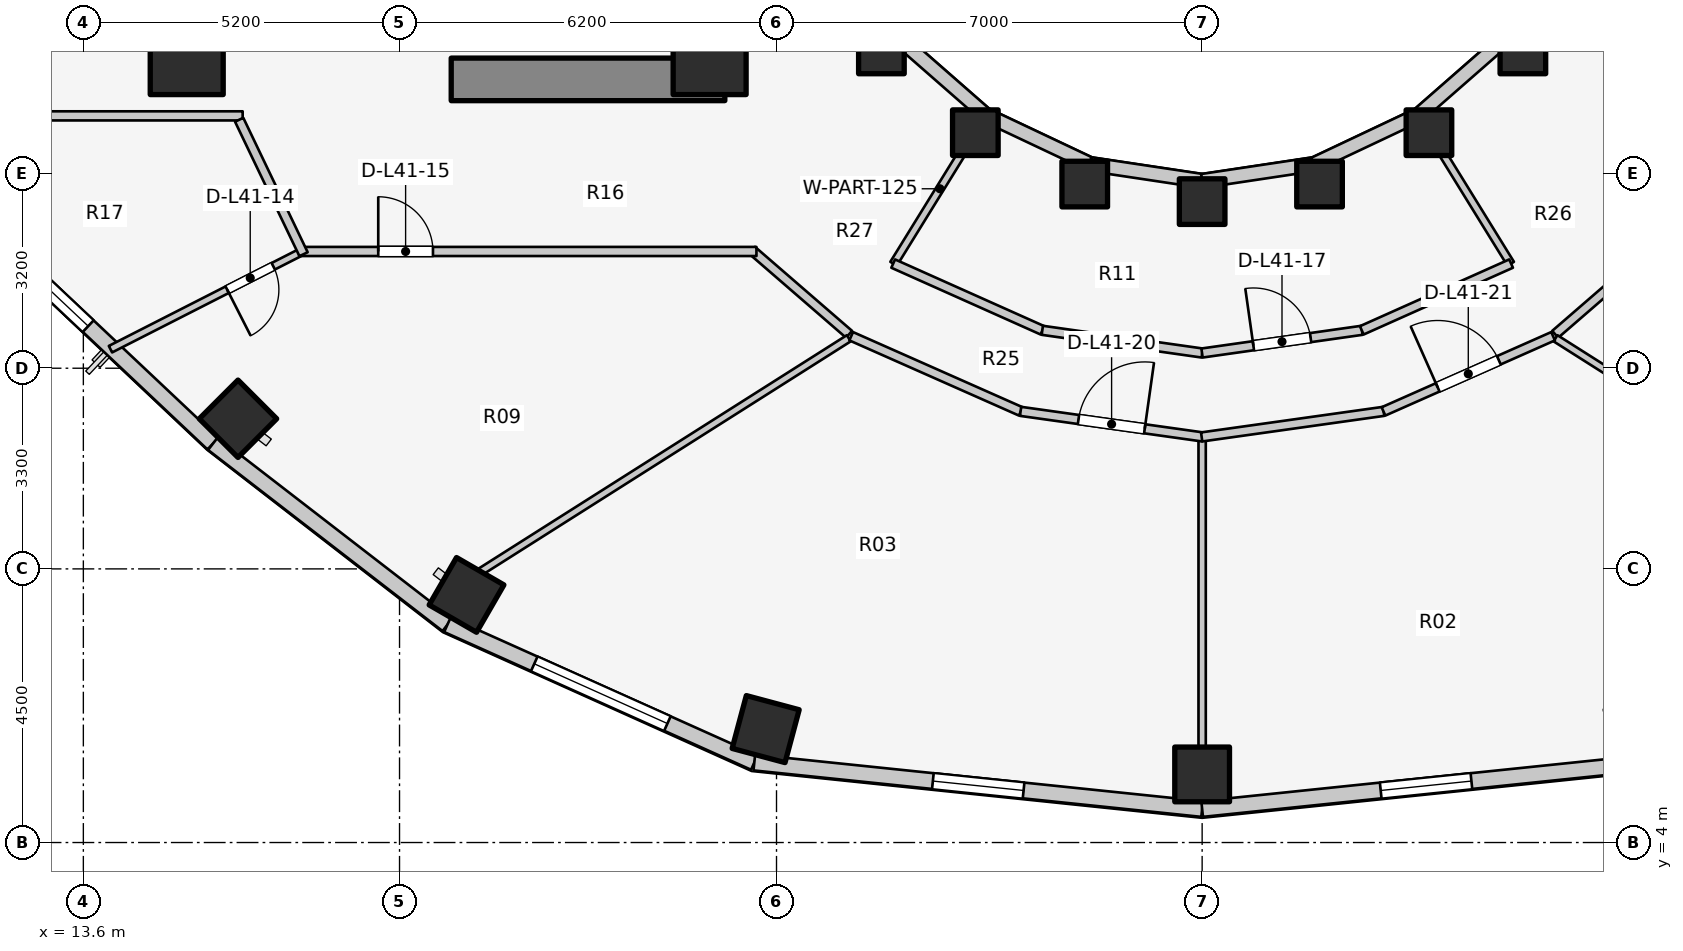
"""IFC4 building model, lengths in metres.
Left out: names, types, materials, properties, quantities, classifications, styles, units other than length and angle.
Written with IfcOpenShell. Run it as: python <this file> out.ifc"""

import sys

from ifc_helpers import new_model, si_unit, direction, frame, frame_2d, origin, origin_2d, place, context, subcontext, project, spatial, rectangle, extrude, element, fill, save


model = new_model("IFC4")
c1 = context("Model", 3, precision=1e-05, world=origin(), true_north=direction((0.0, 1.0)))
c2 = subcontext(c1, "Body", "Model", "MODEL_VIEW")
j1 = project(units=[si_unit("LENGTHUNIT", "METRE"), si_unit("PLANEANGLEUNIT", "RADIAN")], contexts=[c1])
p1 = place(None, origin())
s1 = spatial("IfcSite", under=j1, at=p1, CompositionType="ELEMENT")
p2 = place(p1, origin())
s2 = spatial("IfcBuilding", under=s1, at=p2, CompositionType="ELEMENT")
p3 = place(p2, frame((0.0, 0.0, 137.4)))
s3 = spatial("IfcBuildingStorey", under=s2, at=p3, CompositionType="ELEMENT", Elevation=137.4)
p4 = place(p3, frame((19.65, 16.55, 0.0), z_axis=(0.0, 0.0, 1.0), x_axis=(1.0, 0.0, 0.0)))
e1 = element("IfcWall", 1, at=p4, inside=s3, PredefinedType="SHEAR", context=c2, shape_type="SweptSolid", body=[
    extrude(rectangle(XDim=4.5, YDim=0.7, at=frame_2d((2.25, 0.0))), origin(), (0.0, 0.0, 1.0), 3.1),
])
for number, where, z_axis, x_axis in (
    (2, (15.3, 16.9, 0.0), (0.0, 0.0, 1.0), (1.0, 0.0, 0.0)),
    (3, (23.9, 16.9, 0.0), (0.0, 0.0, 1.0), (1.0, 0.0, 0.0)),
):
    element("IfcColumn", number, at=place(p3, frame(where, z_axis=z_axis, x_axis=x_axis)), inside=s3, PredefinedType="COLUMN", context=c2, shape_type="SweptSolid", body=[
        extrude(rectangle(XDim=1.2, YDim=1.2, at=origin_2d()), origin(), (0.0, 0.0, 1.0), 3.1),
    ])
p5 = place(p3, frame((26.725, 17.018, 0.0), z_axis=(0.0, 0.0, 1.0), x_axis=(1.0, 0.0, 0.0)))
e4 = element("IfcColumn", 4, at=p5, inside=s3, PredefinedType="COLUMN", context=c2, shape_type="SweptSolid", body=[
    extrude(rectangle(XDim=0.75, YDim=0.75, at=origin_2d()), origin(), (0.0, 0.0, 1.0), 3.1),
])
p6 = place(p3, frame((16.143, 10.969, 0.0), z_axis=(0.0, 0.0, 1.0), x_axis=(-0.707106781187, -0.707106781187, 0.0)))
e5 = element("IfcColumn", 5, at=p6, inside=s3, PredefinedType="COLUMN", context=c2, shape_type="SweptSolid", body=[
    extrude(rectangle(XDim=0.9, YDim=0.9, at=origin_2d()), origin(), (0.0, 0.0, 1.0), 3.1),
])
p7 = place(p3, frame((28.27, 15.673, 0.0), z_axis=(0.0, 0.0, 1.0), x_axis=(1.0, 0.0, 0.0)))
e6 = element("IfcColumn", 6, at=p7, inside=s3, PredefinedType="COLUMN", context=c2, shape_type="SweptSolid", body=[
    extrude(rectangle(XDim=0.75, YDim=0.75, at=origin_2d()), origin(), (0.0, 0.0, 1.0), 3.1),
])
p8 = place(p3, frame((19.902, 8.072, 0.0), z_axis=(0.0, 0.0, 1.0), x_axis=(-0.5, -0.866025403784, 0.0)))
e7 = element("IfcColumn", 7, at=p8, inside=s3, PredefinedType="COLUMN", context=c2, shape_type="SweptSolid", body=[
    extrude(rectangle(XDim=0.9, YDim=0.9, at=origin_2d()), origin(), (0.0, 0.0, 1.0), 3.1),
])
p9 = place(p3, frame((30.069, 14.828, 0.0), z_axis=(0.0, 0.0, 1.0), x_axis=(1.0, 0.0, 0.0)))
e8 = element("IfcColumn", 8, at=p9, inside=s3, PredefinedType="COLUMN", context=c2, shape_type="SweptSolid", body=[
    extrude(rectangle(XDim=0.75, YDim=0.75, at=origin_2d()), origin(), (0.0, 0.0, 1.0), 3.1),
])
p10 = place(p3, frame((24.822, 5.865, 0.0), z_axis=(0.0, 0.0, 1.0), x_axis=(-0.258819045103, -0.965925826289, 0.0)))
e9 = element("IfcColumn", 9, at=p10, inside=s3, PredefinedType="COLUMN", context=c2, shape_type="SweptSolid", body=[
    extrude(rectangle(XDim=0.9, YDim=0.9, at=origin_2d()), origin(), (0.0, 0.0, 1.0), 3.1),
])
p11 = place(p3, frame((32.0, 14.54, 0.0), z_axis=(0.0, 0.0, 1.0), x_axis=(1.0, 0.0, 0.0)))
e10 = element("IfcColumn", 10, at=p11, inside=s3, PredefinedType="COLUMN", context=c2, shape_type="SweptSolid", body=[
    extrude(rectangle(XDim=0.75, YDim=0.75, at=origin_2d()), origin(), (0.0, 0.0, 1.0), 3.1),
])
p12 = place(p3, frame((32.0, 5.12, 0.0), z_axis=(0.0, 0.0, 1.0), x_axis=(0.0, -1.0, 0.0)))
e11 = element("IfcColumn", 11, at=p12, inside=s3, PredefinedType="COLUMN", context=c2, shape_type="SweptSolid", body=[
    extrude(rectangle(XDim=0.9, YDim=0.9, at=origin_2d()), origin(), (0.0, 0.0, 1.0), 3.1),
])
for number, where, z_axis, x_axis in (
    (12, (33.931, 14.828, 0.0), (0.0, 0.0, 1.0), (1.0, 0.0, 0.0)),
    (13, (35.73, 15.673, 0.0), (0.0, 0.0, 1.0), (1.0, 0.0, 0.0)),
    (14, (37.275, 17.018, 0.0), (0.0, 0.0, 1.0), (1.0, 0.0, 0.0)),
):
    element("IfcColumn", number, at=place(p3, frame(where, z_axis=z_axis, x_axis=x_axis)), inside=s3, PredefinedType="COLUMN", context=c2, shape_type="SweptSolid", body=[
        extrude(rectangle(XDim=0.75, YDim=0.75, at=origin_2d()), origin(), (0.0, 0.0, 1.0), 3.1),
    ])
p13 = place(p3, frame((26.965, 17.258, 0.0), z_axis=(0.0, 0.0, 1.0), x_axis=(0.752576694707, -0.658504607869, 0.0)))
e15 = element("IfcWall", 15, at=p13, inside=s3, PredefinedType="STANDARD", context=c2, shape_type="SweptSolid", body=[
    extrude(rectangle(XDim=1.959, YDim=0.23, at=frame_2d((0.98, 0.0))), origin(), (0.0, 0.0, 1.0), 2.16),
])
p14 = place(p3, frame((28.44, 15.968, 0.0), z_axis=(0.0, 0.0, 1.0), x_axis=(0.904179699603, -0.427152280606, 0.0)))
e16 = element("IfcWall", 16, at=p14, inside=s3, PredefinedType="STANDARD", context=c2, shape_type="SweptSolid", body=[
    extrude(rectangle(XDim=1.899, YDim=0.23, at=frame_2d((0.95, 0.0))), origin(), (0.0, 0.0, 1.0), 2.16),
])
for number, where, z_axis, x_axis in (
    (17, (30.157, 15.157, 0.0), (0.0, 0.0, 1.0), (0.989, -0.149, 0.0)),
    (18, (32.0, 14.88, 0.0), (0.0, 0.0, 1.0), (0.989, 0.149, 0.0)),
):
    element("IfcWall", number, at=place(p3, frame(where, z_axis=z_axis, x_axis=x_axis)), inside=s3, PredefinedType="STANDARD", context=c2, shape_type="SweptSolid", body=[
        extrude(rectangle(XDim=1.864, YDim=0.23, at=frame_2d((0.932, 0.0))), origin(), (0.0, 0.0, 1.0), 2.16),
    ])
p15 = place(p3, frame((33.843, 15.157, 0.0), z_axis=(0.0, 0.0, 1.0), x_axis=(0.904179699603, 0.427152280606, 0.0)))
e19 = element("IfcWall", 19, at=p15, inside=s3, PredefinedType="STANDARD", context=c2, shape_type="SweptSolid", body=[
    extrude(rectangle(XDim=1.899, YDim=0.23, at=frame_2d((0.95, 0.0))), origin(), (0.0, 0.0, 1.0), 2.16),
])
p16 = place(p3, frame((35.56, 15.968, 0.0), z_axis=(0.0, 0.0, 1.0), x_axis=(0.752576694707, 0.658504607869, 0.0)))
e20 = element("IfcWall", 20, at=p16, inside=s3, PredefinedType="STANDARD", context=c2, shape_type="SweptSolid", body=[
    extrude(rectangle(XDim=1.959, YDim=0.23, at=frame_2d((0.98, 0.0))), origin(), (0.0, 0.0, 1.0), 2.16),
])
p17 = place(p3, frame((12.381, 13.716, 0.0), z_axis=(0.0, 0.0, 1.0), x_axis=(0.727667301037, -0.68593024354, 0.0)))
e21 = element("IfcWall", 21, at=p17, inside=s3, PredefinedType="STANDARD", context=c2, shape_type="SweptSolid", body=[
    extrude(rectangle(XDim=4.604, YDim=0.26, at=frame_2d((2.302, 0.0))), origin(), (0.0, 0.0, 1.0), 2.85),
])
p18 = place(p17, frame((0.585, 0.0, 0.75)))
e22 = element("IfcOpeningElement", 22, at=p18, cuts=e21, PredefinedType="OPENING", context=c2, shape_type="SweptSolid", body=[
    extrude(rectangle(XDim=1.2, YDim=1.5, at=frame_2d((0.6, 0.75))), frame((0.0, 0.14, 0.0), z_axis=(0.0, -1.0, 0.0), x_axis=(1.0, 0.0, 0.0)), (0.0, 0.0, 1.0), 0.28),
])
p19 = place(p3, frame((15.731, 10.559, 0.0), z_axis=(0.0, 0.0, 1.0), x_axis=(0.791460185804, -0.611220724687, 0.0)))
e23 = element("IfcWall", 23, at=p19, inside=s3, PredefinedType="STANDARD", context=c2, shape_type="SweptSolid", body=[
    extrude(rectangle(XDim=4.872, YDim=0.26, at=frame_2d((2.436, 0.0))), origin(), (0.0, 0.0, 1.0), 2.85),
])
p20 = place(p3, frame((19.587, 7.581, 0.0), z_axis=(0.0, 0.0, 1.0), x_axis=(0.912353637112, -0.409403029847, 0.0)))
e24 = element("IfcWall", 24, at=p20, inside=s3, PredefinedType="STANDARD", context=c2, shape_type="SweptSolid", body=[
    extrude(rectangle(XDim=5.533, YDim=0.26, at=frame_2d((2.766, 0.0))), origin(), (0.0, 0.0, 1.0), 2.85),
])
p21 = place(p20, frame((1.566, 0.0, 0.75)))
e25 = element("IfcOpeningElement", 25, at=p21, cuts=e24, PredefinedType="OPENING", context=c2, shape_type="SweptSolid", body=[
    extrude(rectangle(XDim=2.4, YDim=1.7, at=frame_2d((1.2, 0.85))), frame((0.0, 0.14, 0.0), z_axis=(0.0, -1.0, 0.0), x_axis=(1.0, 0.0, 0.0)), (0.0, 0.0, 1.0), 0.28),
])
p22 = place(p3, frame((24.635, 5.315, 0.0), z_axis=(0.0, 0.0, 1.0), x_axis=(0.994664178965, -0.10316574569, 0.0)))
e26 = element("IfcWall", 26, at=p22, inside=s3, PredefinedType="STANDARD", context=c2, shape_type="SweptSolid", body=[
    extrude(rectangle(XDim=7.405, YDim=0.26, at=frame_2d((3.702, 0.0))), origin(), (0.0, 0.0, 1.0), 2.85),
])
p23 = place(p22, frame((2.952, 0.0, 0.75)))
e27 = element("IfcOpeningElement", 27, at=p23, cuts=e26, PredefinedType="OPENING", context=c2, shape_type="SweptSolid", body=[
    extrude(rectangle(XDim=1.5, YDim=1.6, at=frame_2d((0.75, 0.8))), frame((0.0, 0.14, 0.0), z_axis=(0.0, -1.0, 0.0), x_axis=(1.0, 0.0, 0.0)), (0.0, 0.0, 1.0), 0.28),
])
p24 = place(p3, frame((32.0, 4.552, 0.0), z_axis=(0.0, 0.0, 1.0), x_axis=(0.994664178965, 0.10316574569, 0.0)))
e28 = element("IfcWall", 28, at=p24, inside=s3, PredefinedType="STANDARD", context=c2, shape_type="SweptSolid", body=[
    extrude(rectangle(XDim=7.405, YDim=0.26, at=frame_2d((3.702, 0.0))), origin(), (0.0, 0.0, 1.0), 2.85),
])
p25 = place(p24, frame((2.952, 0.0, 0.75)))
e29 = element("IfcOpeningElement", 29, at=p25, cuts=e28, PredefinedType="OPENING", context=c2, shape_type="SweptSolid", body=[
    extrude(rectangle(XDim=1.5, YDim=1.6, at=frame_2d((0.75, 0.8))), frame((0.0, 0.14, 0.0), z_axis=(0.0, -1.0, 0.0), x_axis=(1.0, 0.0, 0.0)), (0.0, 0.0, 1.0), 0.28),
])
p26 = place(p3, frame((10.96, 15.95, 0.0), z_axis=(0.0, 0.0, 1.0), x_axis=(1.0, 0.0, 0.0)))
e30 = element("IfcWall", 30, at=p26, inside=s3, PredefinedType="PARTITIONING", context=c2, shape_type="SweptSolid", body=[
    extrude(rectangle(XDim=5.26, YDim=0.15, at=frame_2d((2.63, 0.0))), origin(), (0.0, 0.0, 1.0), 2.22),
])
p27 = place(p3, frame((17.245, 13.743, 0.0), z_axis=(0.0, 0.0, 1.0), x_axis=(-0.891028597788, -0.453947175258, 0.0)))
e31 = element("IfcWall", 31, at=p27, inside=s3, PredefinedType="MOVABLE", context=c2, shape_type="SweptSolid", body=[
    extrude(rectangle(XDim=3.59, YDim=0.12, at=frame_2d((1.795, 0.0))), origin(), (0.0, 0.0, 1.0), 2.22),
])
p28 = place(p27, frame((0.585, 0.0, 0.0)))
e32 = element("IfcOpeningElement", 32, at=p28, cuts=e31, PredefinedType="OPENING", context=c2, shape_type="SweptSolid", body=[
    extrude(rectangle(XDim=0.85, YDim=2.05, at=frame_2d((0.425, 1.025))), frame((0.0, 0.07, 0.0), z_axis=(0.0, -1.0, 0.0), x_axis=(1.0, 0.0, 0.0)), (0.0, 0.0, 1.0), 0.14),
])
p29 = place(p3, frame((26.193, 12.358, 0.0), z_axis=(0.0, 0.0, 1.0), x_axis=(-0.756055312247, 0.654507727092, 0.0)))
e33 = element("IfcWall", 33, at=p29, inside=s3, PredefinedType="PARTITIONING", context=c2, shape_type="SweptSolid", body=[
    extrude(rectangle(XDim=2.111, YDim=0.15, at=frame_2d((1.055, 0.0))), origin(), (0.0, 0.0, 1.0), 2.299),
])
p30 = place(p3, frame((17.15, 13.72, 0.0), z_axis=(0.0, 0.0, 1.0), x_axis=(1.0, 0.0, 0.0)))
e34 = element("IfcWall", 34, at=p30, inside=s3, PredefinedType="PARTITIONING", context=c2, shape_type="SweptSolid", body=[
    extrude(rectangle(XDim=7.52, YDim=0.15, at=frame_2d((3.76, 0.0))), origin(), (0.0, 0.0, 1.0), 2.299),
])
p31 = place(p30, frame((1.3, 0.0, 0.0)))
e35 = element("IfcOpeningElement", 35, at=p31, cuts=e34, PredefinedType="OPENING", context=c2, shape_type="SweptSolid", body=[
    extrude(rectangle(XDim=0.9, YDim=2.1, at=frame_2d((0.45, 1.05))), frame((0.0, 0.085, 0.0), z_axis=(0.0, -1.0, 0.0), x_axis=(1.0, 0.0, 0.0)), (0.0, 0.0, 1.0), 0.17),
])
p32 = place(p3, frame((17.222, 13.675, 0.0), z_axis=(0.0, 0.0, 1.0), x_axis=(-0.431973389813, 0.901886351207, 0.0)))
e36 = element("IfcWall", 36, at=p32, inside=s3, PredefinedType="PARTITIONING", context=c2, shape_type="SweptSolid", body=[
    extrude(rectangle(XDim=2.452, YDim=0.15, at=frame_2d((1.226, 0.0))), origin(), (0.0, 0.0, 1.0), 2.855),
])
p33 = place(p3, frame((37.807, 12.358, 0.0), z_axis=(0.0, 0.0, 1.0), x_axis=(0.756055312247, 0.654507727092, 0.0)))
e37 = element("IfcWall", 37, at=p33, inside=s3, PredefinedType="PARTITIONING", context=c2, shape_type="SweptSolid", body=[
    extrude(rectangle(XDim=2.111, YDim=0.15, at=frame_2d((1.055, 0.0))), origin(), (0.0, 0.0, 1.0), 2.299),
])
for number, where, z_axis, x_axis in (
    (38, (28.45, 15.985, 0.0), (0.0, 0.0, 1.0), (-0.526, -0.851, 0.0)),
    (39, (35.55, 15.985, 0.0), (0.0, 0.0, 1.0), (0.526, -0.851, 0.0)),
):
    element("IfcWall", number, at=place(p3, frame(where, z_axis=z_axis, x_axis=x_axis)), inside=s3, PredefinedType="PARTITIONING", context=c2, shape_type="SweptSolid", body=[
        extrude(rectangle(XDim=2.901, YDim=0.125, at=frame_2d((1.451, 0.0))), origin(), (0.0, 0.0, 1.0), 2.299),
    ])
p34 = place(p3, frame((26.919, 13.521, 0.0), z_axis=(0.0, 0.0, 1.0), x_axis=(0.912888568324, -0.408208845842, 0.0)))
e40 = element("IfcWall", 40, at=p34, inside=s3, PredefinedType="PARTITIONING", context=c2, shape_type="SweptSolid", body=[
    extrude(rectangle(XDim=2.69, YDim=0.15, at=frame_2d((1.345, 0.0))), origin(), (0.0, 0.0, 1.0), 2.299),
])
p35 = place(p3, frame((29.371, 12.424, 0.0), z_axis=(0.0, 0.0, 1.0), x_axis=(0.990066775667, -0.1405979364, 0.0)))
e41 = element("IfcWall", 41, at=p35, inside=s3, PredefinedType="PARTITIONING", context=c2, shape_type="SweptSolid", body=[
    extrude(rectangle(XDim=2.657, YDim=0.15, at=frame_2d((1.328, 0.0))), origin(), (0.0, 0.0, 1.0), 2.299),
])
p36 = place(p3, frame((31.998, 12.05, 0.0), z_axis=(0.0, 0.0, 1.0), x_axis=(0.990066775667, 0.1405979364, 0.0)))
e42 = element("IfcWall", 42, at=p36, inside=s3, PredefinedType="PARTITIONING", context=c2, shape_type="SweptSolid", body=[
    extrude(rectangle(XDim=2.657, YDim=0.15, at=frame_2d((1.328, 0.0))), origin(), (0.0, 0.0, 1.0), 2.299),
])
p37 = place(p36, frame((0.854, 0.0, 0.0)))
e43 = element("IfcOpeningElement", 43, at=p37, cuts=e42, PredefinedType="OPENING", context=c2, shape_type="SweptSolid", body=[
    extrude(rectangle(XDim=0.95, YDim=2.1, at=frame_2d((0.475, 1.05))), frame((0.0, 0.085, 0.0), z_axis=(0.0, -1.0, 0.0), x_axis=(1.0, 0.0, 0.0)), (0.0, 0.0, 1.0), 0.17),
])
p38 = place(p3, frame((34.625, 12.423, 0.0), z_axis=(0.0, 0.0, 1.0), x_axis=(0.912888568324, 0.408208845842, 0.0)))
e44 = element("IfcWall", 44, at=p38, inside=s3, PredefinedType="PARTITIONING", context=c2, shape_type="SweptSolid", body=[
    extrude(rectangle(XDim=2.69, YDim=0.15, at=frame_2d((1.345, 0.0))), origin(), (0.0, 0.0, 1.0), 2.299),
])
p39 = place(p3, frame((26.188, 12.292, 0.0), z_axis=(0.0, 0.0, 1.0), x_axis=(-0.844640430122, -0.535334048799, 0.0)))
e45 = element("IfcWall", 45, at=p39, inside=s3, PredefinedType="MOVABLE", context=c2, shape_type="SweptSolid", body=[
    extrude(rectangle(XDim=7.188, YDim=0.12, at=frame_2d((3.594, 0.0))), origin(), (0.0, 0.0, 1.0), 2.299),
])
p40 = place(p3, frame((32.0, 10.615, 0.0), z_axis=(0.0, 0.0, 1.0), x_axis=(0.0, -1.0, 0.0)))
e46 = element("IfcWall", 46, at=p40, inside=s3, PredefinedType="MOVABLE", context=c2, shape_type="SweptSolid", body=[
    extrude(rectangle(XDim=5.065, YDim=0.12, at=frame_2d((2.532, 0.0))), origin(), (0.0, 0.0, 1.0), 2.299),
])
p41 = place(p3, frame((37.812, 12.292, 0.0), z_axis=(0.0, 0.0, 1.0), x_axis=(0.844640430122, -0.535334048799, 0.0)))
e47 = element("IfcWall", 47, at=p41, inside=s3, PredefinedType="MOVABLE", context=c2, shape_type="SweptSolid", body=[
    extrude(rectangle(XDim=7.188, YDim=0.12, at=frame_2d((3.594, 0.0))), origin(), (0.0, 0.0, 1.0), 2.299),
])
p42 = place(p3, frame((26.228, 12.326, 0.0), z_axis=(0.0, 0.0, 1.0), x_axis=(0.914216890927, -0.405225216815, 0.0)))
e48 = element("IfcWall", 48, at=p42, inside=s3, PredefinedType="PARTITIONING", context=c2, shape_type="SweptSolid", body=[
    extrude(rectangle(XDim=3.052, YDim=0.15, at=frame_2d((1.526, 0.0))), origin(), (0.0, 0.0, 1.0), 2.299),
])
p43 = place(p3, frame((29.014, 11.091, 0.0), z_axis=(0.0, 0.0, 1.0), x_axis=(0.990263536759, -0.139205343882, 0.0)))
e49 = element("IfcWall", 49, at=p43, inside=s3, PredefinedType="PARTITIONING", context=c2, shape_type="SweptSolid", body=[
    extrude(rectangle(XDim=3.024, YDim=0.15, at=frame_2d((1.512, 0.0))), origin(), (0.0, 0.0, 1.0), 2.299),
])
p44 = place(p43, frame((0.962, 0.0, 0.0)))
e50 = element("IfcOpeningElement", 50, at=p44, cuts=e49, PredefinedType="OPENING", context=c2, shape_type="SweptSolid", body=[
    extrude(rectangle(XDim=1.1, YDim=2.1, at=frame_2d((0.55, 1.05))), frame((0.0, 0.085, 0.0), z_axis=(0.0, -1.0, 0.0), x_axis=(1.0, 0.0, 0.0)), (0.0, 0.0, 1.0), 0.17),
])
p45 = place(p3, frame((31.992, 10.67, 0.0), z_axis=(0.0, 0.0, 1.0), x_axis=(0.990263536759, 0.139205343882, 0.0)))
e51 = element("IfcWall", 51, at=p45, inside=s3, PredefinedType="PARTITIONING", context=c2, shape_type="SweptSolid", body=[
    extrude(rectangle(XDim=3.024, YDim=0.15, at=frame_2d((1.512, 0.0))), origin(), (0.0, 0.0, 1.0), 2.299),
])
p46 = place(p3, frame((34.982, 11.09, 0.0), z_axis=(0.0, 0.0, 1.0), x_axis=(0.914216890927, 0.405225216815, 0.0)))
e52 = element("IfcWall", 52, at=p46, inside=s3, PredefinedType="PARTITIONING", context=c2, shape_type="SweptSolid", body=[
    extrude(rectangle(XDim=3.052, YDim=0.15, at=frame_2d((1.526, 0.0))), origin(), (0.0, 0.0, 1.0), 2.299),
])
p47 = place(p46, frame((0.976, 0.0, 0.0)))
e53 = element("IfcOpeningElement", 53, at=p47, cuts=e52, PredefinedType="OPENING", context=c2, shape_type="SweptSolid", body=[
    extrude(rectangle(XDim=1.1, YDim=2.1, at=frame_2d((0.55, 1.05))), frame((0.0, 0.085, 0.0), z_axis=(0.0, -1.0, 0.0), x_axis=(1.0, 0.0, 0.0)), (0.0, 0.0, 1.0), 0.17),
])
p48 = place(p18, origin())
e54 = element("IfcWindow", 54, at=p48, inside=s3, PartitioningType="SINGLE_PANEL", PredefinedType="WINDOW", context=c2, shape_type="SweptSolid", body=[
    extrude(rectangle(XDim=1.2, YDim=1.5, at=frame_2d((0.6, 0.75))), frame((0.0, 0.03, 0.0), z_axis=(0.0, -1.0, 0.0), x_axis=(1.0, 0.0, 0.0)), (0.0, 0.0, 1.0), 0.06),
])
fill(e22, e54)
p49 = place(p21, origin())
e55 = element("IfcWindow", 55, at=p49, inside=s3, PartitioningType="SINGLE_PANEL", PredefinedType="WINDOW", context=c2, shape_type="SweptSolid", body=[
    extrude(rectangle(XDim=2.4, YDim=1.7, at=frame_2d((1.2, 0.85))), frame((0.0, 0.03, 0.0), z_axis=(0.0, -1.0, 0.0), x_axis=(1.0, 0.0, 0.0)), (0.0, 0.0, 1.0), 0.06),
])
fill(e25, e55)
p50 = place(p23, origin())
e56 = element("IfcWindow", 56, at=p50, inside=s3, PartitioningType="SINGLE_PANEL", PredefinedType="WINDOW", context=c2, shape_type="SweptSolid", body=[
    extrude(rectangle(XDim=1.5, YDim=1.6, at=frame_2d((0.75, 0.8))), frame((0.0, 0.03, 0.0), z_axis=(0.0, -1.0, 0.0), x_axis=(1.0, 0.0, 0.0)), (0.0, 0.0, 1.0), 0.06),
])
fill(e27, e56)
p51 = place(p25, origin())
e57 = element("IfcWindow", 57, at=p51, inside=s3, PartitioningType="SINGLE_PANEL", PredefinedType="WINDOW", context=c2, shape_type="SweptSolid", body=[
    extrude(rectangle(XDim=1.5, YDim=1.6, at=frame_2d((0.75, 0.8))), frame((0.0, 0.03, 0.0), z_axis=(0.0, -1.0, 0.0), x_axis=(1.0, 0.0, 0.0)), (0.0, 0.0, 1.0), 0.06),
])
fill(e29, e57)
p52 = place(p28, origin())
e58 = element("IfcDoor", 58, at=p52, inside=s3, OperationType="SINGLE_SWING_RIGHT", PredefinedType="DOOR", context=c2, shape_type="SweptSolid", body=[
    extrude(rectangle(XDim=0.85, YDim=2.05, at=frame_2d((0.425, 1.025))), frame((0.0, 0.025, 0.0), z_axis=(0.0, -1.0, 0.0), x_axis=(1.0, 0.0, 0.0)), (0.0, 0.0, 1.0), 0.05),
])
fill(e32, e58)
p53 = place(p31, origin())
e59 = element("IfcDoor", 59, at=p53, inside=s3, OperationType="SINGLE_SWING_LEFT", PredefinedType="DOOR", context=c2, shape_type="SweptSolid", body=[
    extrude(rectangle(XDim=0.9, YDim=2.1, at=frame_2d((0.45, 1.05))), frame((0.0, 0.025, 0.0), z_axis=(0.0, -1.0, 0.0), x_axis=(1.0, 0.0, 0.0)), (0.0, 0.0, 1.0), 0.05),
])
fill(e35, e59)
p54 = place(p37, origin())
e60 = element("IfcDoor", 60, at=p54, inside=s3, OperationType="SINGLE_SWING_LEFT", PredefinedType="DOOR", context=c2, shape_type="SweptSolid", body=[
    extrude(rectangle(XDim=0.95, YDim=2.1, at=frame_2d((0.475, 1.05))), frame((0.0, 0.025, 0.0), z_axis=(0.0, -1.0, 0.0), x_axis=(1.0, 0.0, 0.0)), (0.0, 0.0, 1.0), 0.05),
])
fill(e43, e60)
p55 = place(p44, origin())
e61 = element("IfcDoor", 61, at=p55, inside=s3, OperationType="SINGLE_SWING_RIGHT", PredefinedType="DOOR", context=c2, shape_type="SweptSolid", body=[
    extrude(rectangle(XDim=1.1, YDim=2.1, at=frame_2d((0.55, 1.05))), frame((0.0, 0.025, 0.0), z_axis=(0.0, -1.0, 0.0), x_axis=(1.0, 0.0, 0.0)), (0.0, 0.0, 1.0), 0.05),
])
fill(e50, e61)
p56 = place(p47, origin())
e62 = element("IfcDoor", 62, at=p56, inside=s3, OperationType="SINGLE_SWING_LEFT", PredefinedType="DOOR", context=c2, shape_type="SweptSolid", body=[
    extrude(rectangle(XDim=1.1, YDim=2.1, at=frame_2d((0.55, 1.05))), frame((0.0, 0.025, 0.0), z_axis=(0.0, -1.0, 0.0), x_axis=(1.0, 0.0, 0.0)), (0.0, 0.0, 1.0), 0.05),
])
fill(e53, e62)
save(model, sys.argv[1])
